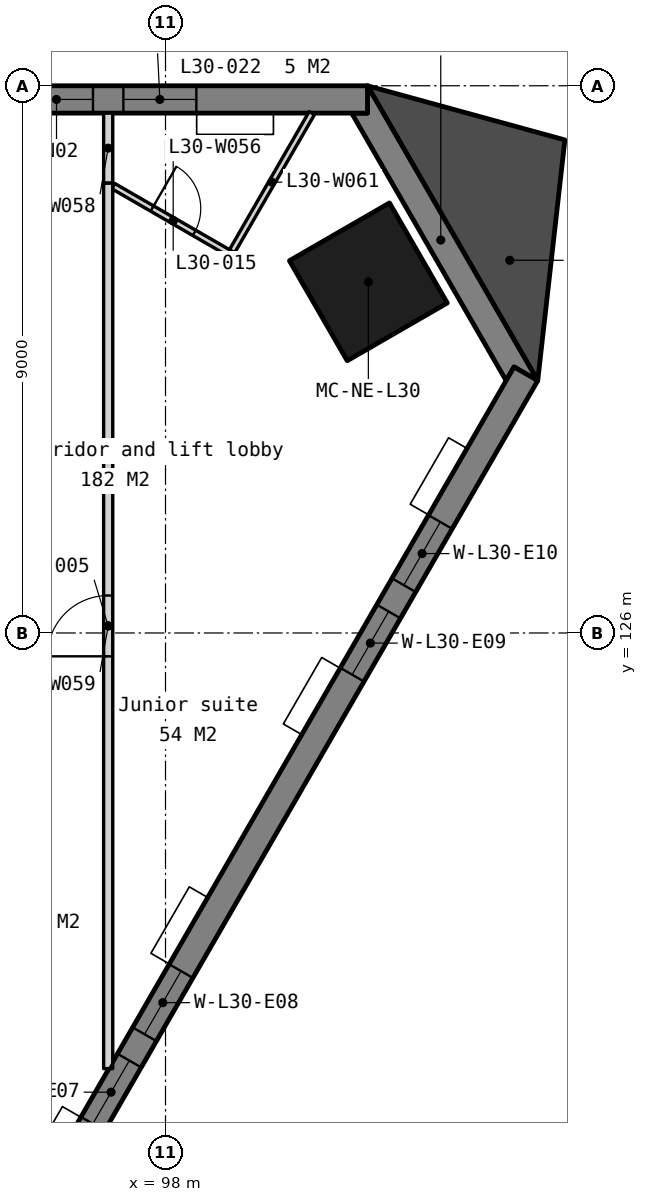
"""IFC4 building model, lengths in metres.
Left out: names, types, materials, properties, quantities, classifications, styles, units other than length and angle.
Written with IfcOpenShell. Run it as: python <this file> out.ifc"""

import sys

from ifc_helpers import new_model, si_unit, direction, frame, frame_2d, origin, origin_2d, place, context, subcontext, project, spatial, polyline, rectangle, outline, extrude, element, fill, save


model = new_model("IFC4")
c1 = context("Model", 3, precision=1e-05, world=origin(), true_north=direction((0.0, 1.0)))
c2 = subcontext(c1, "Body", "Model", "MODEL_VIEW")
j1 = project(units=[si_unit("LENGTHUNIT", "METRE"), si_unit("PLANEANGLEUNIT", "RADIAN")], contexts=[c1])
p1 = place(None, origin())
s1 = spatial("IfcSite", under=j1, at=p1, CompositionType="ELEMENT")
p2 = place(p1, origin())
s2 = spatial("IfcBuilding", under=s1, at=p2, CompositionType="ELEMENT")
p3 = place(p2, frame((0.0, 0.0, 120.3)))
s3 = spatial("IfcBuildingStorey", under=s2, at=p3, CompositionType="ELEMENT", Elevation=120.3)
p4 = place(p3, frame((101.336, 131.775, 0.0), z_axis=(0.0, 0.0, 1.0), x_axis=(-0.5, 0.866025403784, 0.0)))
e1 = element("IfcColumn", 1, at=p4, inside=s3, PredefinedType="COLUMN", context=c2, shape_type="SweptSolid", body=[
    extrude(rectangle(XDim=1.9, YDim=1.9, at=origin_2d()), origin(), (0.0, 0.0, 1.0), 3.5),
])
p5 = place(p3, frame((0.0, 0.0, -0.15)))
e2 = element("IfcWall", 2, at=p5, inside=s3, PredefinedType="SOLIDWALL", context=c2, shape_type="SweptSolid", body=[
    extrude(outline(polyline([(104.122, 130.15), (103.732, 130.375), (103.602, 130.15), (101.062, 134.55), (101.322, 134.55), (101.322, 135.0), (104.122, 130.15)])), origin(), (0.0, 0.0, 1.0), 3.4),
])
p6 = place(p3, frame((101.322, 134.775, -0.15), z_axis=(0.0, 0.0, 1.0), x_axis=(-1.0, 0.0, 0.0)))
e3 = element("IfcWall", 3, at=p6, inside=s3, PredefinedType="SOLIDWALL", context=c2, shape_type="SweptSolid", body=[
    extrude(outline(polyline([(42.643, 0.0), (42.643, 3.4), (0.0, 3.4), (0.0, 0.0), (42.643, 0.0)])), frame((0.0, 0.225, 0.0), z_axis=(0.0, -1.0, 0.0), x_axis=(1.0, 0.0, 0.0)), (0.0, 0.0, 1.0), 0.45),
])
p7 = place(p6, frame((2.814, 0.0, 1.05)))
e4 = element("IfcOpeningElement", 4, at=p7, cuts=e3, PredefinedType="OPENING", context=c2, shape_type="SweptSolid", body=[
    extrude(rectangle(XDim=1.2, YDim=1.5, at=frame_2d((0.6, 0.75))), frame((0.0, 0.235, 0.0), z_axis=(0.0, -1.0, 0.0), x_axis=(1.0, 0.0, 0.0)), (0.0, 0.0, 1.0), 0.47),
])
p8 = place(p6, frame((4.514, 0.0, 1.05)))
e5 = element("IfcOpeningElement", 5, at=p8, cuts=e3, PredefinedType="OPENING", context=c2, shape_type="SweptSolid", body=[
    extrude(rectangle(XDim=1.2, YDim=1.5, at=frame_2d((0.6, 0.75))), frame((0.0, 0.235, 0.0), z_axis=(0.0, -1.0, 0.0), x_axis=(1.0, 0.0, 0.0)), (0.0, 0.0, 1.0), 0.47),
])
p9 = place(p6, frame((11.343, 0.0, 1.05)))
e6 = element("IfcOpeningElement", 6, at=p9, cuts=e3, PredefinedType="OPENING", context=c2, shape_type="SweptSolid", body=[
    extrude(rectangle(XDim=1.2, YDim=1.5, at=frame_2d((0.6, 0.75))), frame((0.0, 0.235, 0.0), z_axis=(0.0, -1.0, 0.0), x_axis=(1.0, 0.0, 0.0)), (0.0, 0.0, 1.0), 0.47),
])
p10 = place(p6, frame((13.043, 0.0, 1.05)))
e7 = element("IfcOpeningElement", 7, at=p10, cuts=e3, PredefinedType="OPENING", context=c2, shape_type="SweptSolid", body=[
    extrude(rectangle(XDim=1.2, YDim=1.5, at=frame_2d((0.6, 0.75))), frame((0.0, 0.235, 0.0), z_axis=(0.0, -1.0, 0.0), x_axis=(1.0, 0.0, 0.0)), (0.0, 0.0, 1.0), 0.47),
])
p11 = place(p6, frame((19.872, 0.0, 1.05)))
e8 = element("IfcOpeningElement", 8, at=p11, cuts=e3, PredefinedType="OPENING", context=c2, shape_type="SweptSolid", body=[
    extrude(rectangle(XDim=1.2, YDim=1.5, at=frame_2d((0.6, 0.75))), frame((0.0, 0.235, 0.0), z_axis=(0.0, -1.0, 0.0), x_axis=(1.0, 0.0, 0.0)), (0.0, 0.0, 1.0), 0.47),
])
p12 = place(p6, frame((21.572, 0.0, 1.05)))
e9 = element("IfcOpeningElement", 9, at=p12, cuts=e3, PredefinedType="OPENING", context=c2, shape_type="SweptSolid", body=[
    extrude(rectangle(XDim=1.2, YDim=1.5, at=frame_2d((0.6, 0.75))), frame((0.0, 0.235, 0.0), z_axis=(0.0, -1.0, 0.0), x_axis=(1.0, 0.0, 0.0)), (0.0, 0.0, 1.0), 0.47),
])
p13 = place(p6, frame((28.4, 0.0, 1.05)))
e10 = element("IfcOpeningElement", 10, at=p13, cuts=e3, PredefinedType="OPENING", context=c2, shape_type="SweptSolid", body=[
    extrude(rectangle(XDim=1.2, YDim=1.5, at=frame_2d((0.6, 0.75))), frame((0.0, 0.235, 0.0), z_axis=(0.0, -1.0, 0.0), x_axis=(1.0, 0.0, 0.0)), (0.0, 0.0, 1.0), 0.47),
])
p14 = place(p6, frame((30.1, 0.0, 1.05)))
e11 = element("IfcOpeningElement", 11, at=p14, cuts=e3, PredefinedType="OPENING", context=c2, shape_type="SweptSolid", body=[
    extrude(rectangle(XDim=1.2, YDim=1.5, at=frame_2d((0.6, 0.75))), frame((0.0, 0.235, 0.0), z_axis=(0.0, -1.0, 0.0), x_axis=(1.0, 0.0, 0.0)), (0.0, 0.0, 1.0), 0.47),
])
p15 = place(p6, frame((36.929, 0.0, 1.05)))
e12 = element("IfcOpeningElement", 12, at=p15, cuts=e3, PredefinedType="OPENING", context=c2, shape_type="SweptSolid", body=[
    extrude(rectangle(XDim=1.2, YDim=1.5, at=frame_2d((0.6, 0.75))), frame((0.0, 0.235, 0.0), z_axis=(0.0, -1.0, 0.0), x_axis=(1.0, 0.0, 0.0)), (0.0, 0.0, 1.0), 0.47),
])
p16 = place(p6, frame((38.629, 0.0, 1.05)))
e13 = element("IfcOpeningElement", 13, at=p16, cuts=e3, PredefinedType="OPENING", context=c2, shape_type="SweptSolid", body=[
    extrude(rectangle(XDim=1.2, YDim=1.5, at=frame_2d((0.6, 0.75))), frame((0.0, 0.235, 0.0), z_axis=(0.0, -1.0, 0.0), x_axis=(1.0, 0.0, 0.0)), (0.0, 0.0, 1.0), 0.47),
])
p17 = place(p3, frame((82.605, 93.333, -0.15), z_axis=(0.0, 0.0, 1.0), x_axis=(0.500000478905, 0.866025127289, 0.0)))
e14 = element("IfcWall", 14, at=p17, inside=s3, PredefinedType="SOLIDWALL", context=c2, shape_type="SweptSolid", body=[
    extrude(outline(polyline([(42.643, 0.0), (42.643, 3.4), (0.0, 3.4), (0.0, 0.0), (42.643, 0.0)])), frame((0.0, 0.225, 0.0), z_axis=(0.0, -1.0, 0.0), x_axis=(1.0, 0.0, 0.0)), (0.0, 0.0, 1.0), 0.45),
])
p18 = place(p17, frame((2.814, 0.0, 1.05)))
e15 = element("IfcOpeningElement", 15, at=p18, cuts=e14, PredefinedType="OPENING", context=c2, shape_type="SweptSolid", body=[
    extrude(rectangle(XDim=1.2, YDim=1.5, at=frame_2d((0.6, 0.75))), frame((0.0, 0.235, 0.0), z_axis=(0.0, -1.0, 0.0), x_axis=(1.0, 0.0, 0.0)), (0.0, 0.0, 1.0), 0.47),
])
p19 = place(p17, frame((4.514, 0.0, 1.05)))
e16 = element("IfcOpeningElement", 16, at=p19, cuts=e14, PredefinedType="OPENING", context=c2, shape_type="SweptSolid", body=[
    extrude(rectangle(XDim=1.2, YDim=1.5, at=frame_2d((0.6, 0.75))), frame((0.0, 0.235, 0.0), z_axis=(0.0, -1.0, 0.0), x_axis=(1.0, 0.0, 0.0)), (0.0, 0.0, 1.0), 0.47),
])
p20 = place(p17, frame((11.343, 0.0, 1.05)))
e17 = element("IfcOpeningElement", 17, at=p20, cuts=e14, PredefinedType="OPENING", context=c2, shape_type="SweptSolid", body=[
    extrude(rectangle(XDim=1.2, YDim=1.5, at=frame_2d((0.6, 0.75))), frame((0.0, 0.235, 0.0), z_axis=(0.0, -1.0, 0.0), x_axis=(1.0, 0.0, 0.0)), (0.0, 0.0, 1.0), 0.47),
])
p21 = place(p17, frame((13.043, 0.0, 1.05)))
e18 = element("IfcOpeningElement", 18, at=p21, cuts=e14, PredefinedType="OPENING", context=c2, shape_type="SweptSolid", body=[
    extrude(rectangle(XDim=1.2, YDim=1.5, at=frame_2d((0.6, 0.75))), frame((0.0, 0.235, 0.0), z_axis=(0.0, -1.0, 0.0), x_axis=(1.0, 0.0, 0.0)), (0.0, 0.0, 1.0), 0.47),
])
p22 = place(p17, frame((19.872, 0.0, 1.05)))
e19 = element("IfcOpeningElement", 19, at=p22, cuts=e14, PredefinedType="OPENING", context=c2, shape_type="SweptSolid", body=[
    extrude(rectangle(XDim=1.2, YDim=1.5, at=frame_2d((0.6, 0.75))), frame((0.0, 0.235, 0.0), z_axis=(0.0, -1.0, 0.0), x_axis=(1.0, 0.0, 0.0)), (0.0, 0.0, 1.0), 0.47),
])
p23 = place(p17, frame((21.572, 0.0, 1.05)))
e20 = element("IfcOpeningElement", 20, at=p23, cuts=e14, PredefinedType="OPENING", context=c2, shape_type="SweptSolid", body=[
    extrude(rectangle(XDim=1.2, YDim=1.5, at=frame_2d((0.6, 0.75))), frame((0.0, 0.235, 0.0), z_axis=(0.0, -1.0, 0.0), x_axis=(1.0, 0.0, 0.0)), (0.0, 0.0, 1.0), 0.47),
])
p24 = place(p17, frame((28.4, 0.0, 1.05)))
e21 = element("IfcOpeningElement", 21, at=p24, cuts=e14, PredefinedType="OPENING", context=c2, shape_type="SweptSolid", body=[
    extrude(rectangle(XDim=1.2, YDim=1.5, at=frame_2d((0.6, 0.75))), frame((0.0, 0.235, 0.0), z_axis=(0.0, -1.0, 0.0), x_axis=(1.0, 0.0, 0.0)), (0.0, 0.0, 1.0), 0.47),
])
p25 = place(p17, frame((30.1, 0.0, 1.05)))
e22 = element("IfcOpeningElement", 22, at=p25, cuts=e14, PredefinedType="OPENING", context=c2, shape_type="SweptSolid", body=[
    extrude(rectangle(XDim=1.2, YDim=1.5, at=frame_2d((0.6, 0.75))), frame((0.0, 0.235, 0.0), z_axis=(0.0, -1.0, 0.0), x_axis=(1.0, 0.0, 0.0)), (0.0, 0.0, 1.0), 0.47),
])
p26 = place(p17, frame((36.929, 0.0, 1.05)))
e23 = element("IfcOpeningElement", 23, at=p26, cuts=e14, PredefinedType="OPENING", context=c2, shape_type="SweptSolid", body=[
    extrude(rectangle(XDim=1.2, YDim=1.5, at=frame_2d((0.6, 0.75))), frame((0.0, 0.235, 0.0), z_axis=(0.0, -1.0, 0.0), x_axis=(1.0, 0.0, 0.0)), (0.0, 0.0, 1.0), 0.47),
])
p27 = place(p17, frame((38.629, 0.0, 1.05)))
e24 = element("IfcOpeningElement", 24, at=p27, cuts=e14, PredefinedType="OPENING", context=c2, shape_type="SweptSolid", body=[
    extrude(rectangle(XDim=1.2, YDim=1.5, at=frame_2d((0.6, 0.75))), frame((0.0, 0.235, 0.0), z_axis=(0.0, -1.0, 0.0), x_axis=(1.0, 0.0, 0.0)), (0.0, 0.0, 1.0), 0.47),
])
p28 = place(p3, frame((0.0, 0.0, -0.15)))
e25 = element("IfcWall", 25, at=p28, inside=s3, PredefinedType="SOLIDWALL", context=c2, shape_type="SweptSolid", body=[
    extrude(outline(polyline([(104.122, 130.15), (104.568, 134.109), (101.322, 135.0), (104.122, 130.15)])), origin(), (0.0, 0.0, 1.0), 3.4),
])
p29 = place(p3, frame((97.139, 133.35, 0.0), z_axis=(0.0, 0.0, 1.0), x_axis=(0.866039300388, -0.499975929603, 0.0)))
e26 = element("IfcWall", 26, at=p29, inside=s3, PredefinedType="PARTITIONING", context=c2, shape_type="SweptSolid", body=[
    extrude(rectangle(XDim=2.279, YDim=0.1, at=frame_2d((1.139, 0.0))), origin(), (0.0, 0.0, 1.0), 3.25),
])
p30 = place(p29, frame((0.74, 0.0, 0.0)))
e27 = element("IfcOpeningElement", 27, at=p30, cuts=e26, PredefinedType="OPENING", context=c2, shape_type="SweptSolid", body=[
    extrude(rectangle(XDim=0.8, YDim=2.1, at=frame_2d((0.4, 1.05))), frame((0.0, 0.06, 0.0), z_axis=(0.0, -1.0, 0.0), x_axis=(1.0, 0.0, 0.0)), (0.0, 0.0, 1.0), 0.12),
])
p31 = place(p3, frame((97.057, 133.398, 0.0), z_axis=(0.0, 0.0, 1.0), x_axis=(0.0, 1.0, 0.0)))
e28 = element("IfcWall", 28, at=p31, inside=s3, PredefinedType="PARTITIONING", context=c2, shape_type="SweptSolid", body=[
    extrude(rectangle(XDim=1.152, YDim=0.15, at=frame_2d((0.576, 0.0))), origin(), (0.0, 0.0, 1.0), 3.25),
])
p32 = place(p3, frame((97.057, 118.834, 0.0), z_axis=(0.0, 0.0, 1.0), x_axis=(0.0, 1.0, 0.0)))
e29 = element("IfcWall", 29, at=p32, inside=s3, PredefinedType="PARTITIONING", context=c2, shape_type="SweptSolid", body=[
    extrude(rectangle(XDim=14.563, YDim=0.15, at=frame_2d((7.282, 0.0))), origin(), (0.0, 0.0, 1.0), 3.25),
])
p33 = place(p32, frame((6.782, 0.0, 0.0)))
e30 = element("IfcOpeningElement", 30, at=p33, cuts=e29, PredefinedType="OPENING", context=c2, shape_type="SweptSolid", body=[
    extrude(rectangle(XDim=1.0, YDim=2.1, at=frame_2d((0.5, 1.05))), frame((0.0, 0.085, 0.0), z_axis=(0.0, -1.0, 0.0), x_axis=(1.0, 0.0, 0.0)), (0.0, 0.0, 1.0), 0.17),
])
p34 = place(p3, frame((99.095, 132.279, 0.0), z_axis=(0.0, 0.0, 1.0), x_axis=(0.500004549355, 0.866022777197, 0.0)))
e31 = element("IfcWall", 31, at=p34, inside=s3, PredefinedType="PARTITIONING", context=c2, shape_type="SweptSolid", body=[
    extrude(rectangle(XDim=2.622, YDim=0.1, at=frame_2d((1.311, 0.0))), origin(), (0.0, 0.0, 1.0), 3.25),
])
p35 = place(p7, origin())
e32 = element("IfcWindow", 32, at=p35, inside=s3, PartitioningType="SINGLE_PANEL", PredefinedType="WINDOW", context=c2, shape_type="SweptSolid", body=[
    extrude(rectangle(XDim=1.2, YDim=1.5, at=frame_2d((0.6, 0.75))), frame((0.0, 0.03, 0.0), z_axis=(0.0, -1.0, 0.0), x_axis=(1.0, 0.0, 0.0)), (0.0, 0.0, 1.0), 0.06),
])
fill(e4, e32)
p36 = place(p8, origin())
e33 = element("IfcWindow", 33, at=p36, inside=s3, PartitioningType="SINGLE_PANEL", PredefinedType="WINDOW", context=c2, shape_type="SweptSolid", body=[
    extrude(rectangle(XDim=1.2, YDim=1.5, at=frame_2d((0.6, 0.75))), frame((0.0, 0.03, 0.0), z_axis=(0.0, -1.0, 0.0), x_axis=(1.0, 0.0, 0.0)), (0.0, 0.0, 1.0), 0.06),
])
fill(e5, e33)
p37 = place(p24, origin())
e34 = element("IfcWindow", 34, at=p37, inside=s3, PartitioningType="SINGLE_PANEL", PredefinedType="WINDOW", context=c2, shape_type="SweptSolid", body=[
    extrude(rectangle(XDim=1.2, YDim=1.5, at=frame_2d((0.6, 0.75))), frame((0.0, 0.03, 0.0), z_axis=(0.0, -1.0, 0.0), x_axis=(1.0, 0.0, 0.0)), (0.0, 0.0, 1.0), 0.06),
])
fill(e21, e34)
p38 = place(p25, origin())
e35 = element("IfcWindow", 35, at=p38, inside=s3, PartitioningType="SINGLE_PANEL", PredefinedType="WINDOW", context=c2, shape_type="SweptSolid", body=[
    extrude(rectangle(XDim=1.2, YDim=1.5, at=frame_2d((0.6, 0.75))), frame((0.0, 0.03, 0.0), z_axis=(0.0, -1.0, 0.0), x_axis=(1.0, 0.0, 0.0)), (0.0, 0.0, 1.0), 0.06),
])
fill(e22, e35)
p39 = place(p26, origin())
e36 = element("IfcWindow", 36, at=p39, inside=s3, PartitioningType="SINGLE_PANEL", PredefinedType="WINDOW", context=c2, shape_type="SweptSolid", body=[
    extrude(rectangle(XDim=1.2, YDim=1.5, at=frame_2d((0.6, 0.75))), frame((0.0, 0.03, 0.0), z_axis=(0.0, -1.0, 0.0), x_axis=(1.0, 0.0, 0.0)), (0.0, 0.0, 1.0), 0.06),
])
fill(e23, e36)
p40 = place(p27, origin())
e37 = element("IfcWindow", 37, at=p40, inside=s3, PartitioningType="SINGLE_PANEL", PredefinedType="WINDOW", context=c2, shape_type="SweptSolid", body=[
    extrude(rectangle(XDim=1.2, YDim=1.5, at=frame_2d((0.6, 0.75))), frame((0.0, 0.03, 0.0), z_axis=(0.0, -1.0, 0.0), x_axis=(1.0, 0.0, 0.0)), (0.0, 0.0, 1.0), 0.06),
])
fill(e24, e37)
p41 = place(p33, origin())
e38 = element("IfcDoor", 38, at=p41, inside=s3, OperationType="SINGLE_SWING_LEFT", PredefinedType="DOOR", context=c2, shape_type="SweptSolid", body=[
    extrude(rectangle(XDim=1.0, YDim=2.1, at=frame_2d((0.5, 1.05))), frame((0.0, 0.025, 0.0), z_axis=(0.0, -1.0, 0.0), x_axis=(1.0, 0.0, 0.0)), (0.0, 0.0, 1.0), 0.05),
])
fill(e30, e38)
p42 = place(p30, origin())
e39 = element("IfcDoor", 39, at=p42, inside=s3, OperationType="SINGLE_SWING_LEFT", PredefinedType="DOOR", context=c2, shape_type="SweptSolid", body=[
    extrude(rectangle(XDim=0.8, YDim=2.1, at=frame_2d((0.4, 1.05))), frame((0.0, 0.025, 0.0), z_axis=(0.0, -1.0, 0.0), x_axis=(1.0, 0.0, 0.0)), (0.0, 0.0, 1.0), 0.05),
])
fill(e27, e39)
save(model, sys.argv[1])
